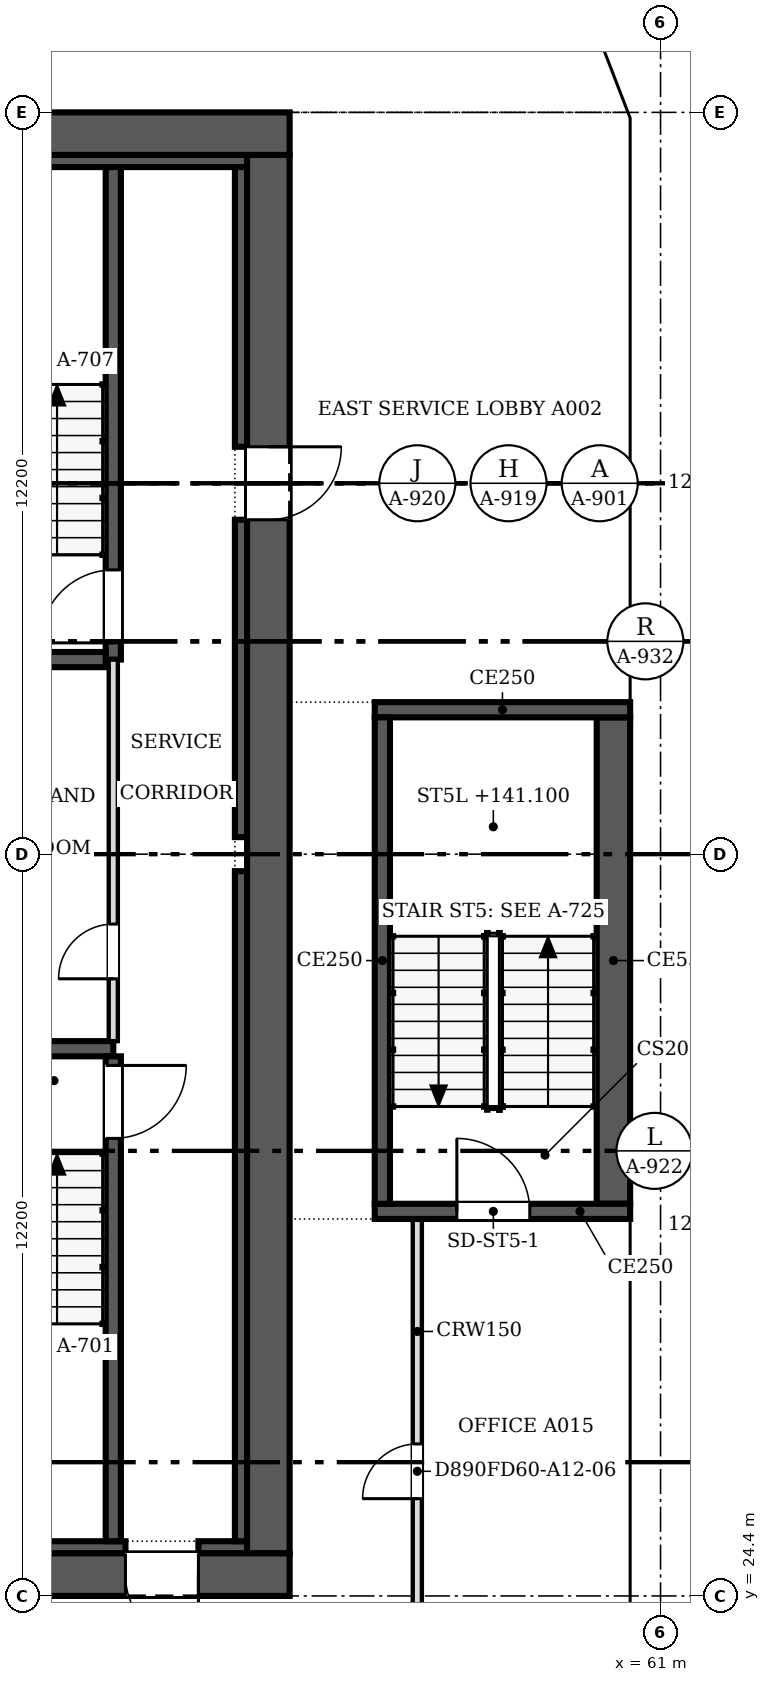
"""IFC4 building model, lengths in metres.
Left out: names, types, materials, properties, quantities, classifications, styles, units other than length and angle.
Written with IfcOpenShell. Run it as: python <this file> out.ifc"""

import sys

from ifc_helpers import new_model, si_unit, direction, frame, frame_2d, origin, place, context, subcontext, project, spatial, polyline, rectangle, outline, extrude, faceted_brep, source, transform, mapped, element, fill, save


model = new_model("IFC4")
c1 = context("Model", 3, precision=1e-05, world=origin(), true_north=direction((0.0, 1.0)))
c2 = subcontext(c1, "Body", "Model", "MODEL_VIEW")
j1 = project(units=[si_unit("LENGTHUNIT", "METRE"), si_unit("PLANEANGLEUNIT", "RADIAN")], contexts=[c1])
p1 = place(None, origin())
s1 = spatial("IfcSite", under=j1, at=p1, CompositionType="ELEMENT")
p2 = place(p1, origin())
s2 = spatial("IfcBuilding", under=s1, at=p2, CompositionType="ELEMENT")
p3 = place(p2, frame((0.0, 0.0, 139.2)))
s3 = spatial("IfcBuildingStorey", under=s2, at=p3, CompositionType="ELEMENT", Elevation=139.2)
m1 = source(origin(), c2, "Body", "Brep", [
    faceted_brep([(3.05, -0.25, 0.0), (6.1, -0.25, 3.8), (6.1, -0.25, 3.8), (3.05, -0.25, 7.6), (0.0, -0.25, 3.8), (0.0, 0.25, 3.8), (3.05, 0.25, 7.6), (6.1, 0.25, 3.8), (6.1, 0.25, 3.8), (3.05, 0.25, 0.0)], [[[0, 1, 2, 3, 4]], [[5, 6, 7, 8, 9]], [[9, 8, 1, 0]], [[7, 6, 3, 2]], [[6, 5, 4, 3]], [[5, 9, 0, 4]], [[1, 8, 7, 2]]]),
])
p4 = place(p3, frame((60.75, 21.35, -3.8), z_axis=(0.0, 0.0, 1.0), x_axis=(0.0, 1.0, 0.0)))
e1 = element("IfcWall", 1, at=p4, inside=s3, PredefinedType="SOLIDWALL", context=c2, shape_type="MappedRepresentation", body=[
    mapped(m1, transform((0.0, 0.0, 0.0), scale=1.0)),
])
m2 = source(origin(), c2, "Body", "SweptSolid", [
    extrude(outline(polyline([(3.05, 0.399), (5.78, 3.8), (3.05, 7.201), (0.321, 3.8), (3.05, 0.399)])), frame((0.0, 0.26, 0.0), z_axis=(0.0, -1.0, 0.0), x_axis=(1.0, 0.0, 0.0)), (0.0, 0.0, 1.0), 0.52),
])
p5 = place(p4, origin())
e2 = element("IfcOpeningElement", 2, at=p5, cuts=e1, PredefinedType="OPENING", context=c2, shape_type="MappedRepresentation", body=[
    mapped(m2, transform((0.0, 0.0, 0.0), scale=1.0)),
])
m3 = source(origin(), c2, "Body", "SweptSolid", [
    extrude(outline(polyline([(3.05, 0.0), (6.1, 3.8), (3.05, 7.6), (0.0, 3.8), (3.05, 0.0)])), frame((0.0, 0.25, 0.0), z_axis=(0.0, -1.0, 0.0), x_axis=(1.0, 0.0, 0.0)), (0.0, 0.0, 1.0), 0.5),
])
p6 = place(p3, frame((60.75, 27.45, -3.8), z_axis=(0.0, 0.0, 1.0), x_axis=(0.0, 1.0, 0.0)))
e3 = element("IfcWall", 3, at=p6, inside=s3, PredefinedType="SOLIDWALL", context=c2, shape_type="MappedRepresentation", body=[
    mapped(m3, transform((0.0, 0.0, 0.0), scale=1.0)),
])
p7 = place(p6, origin())
e4 = element("IfcOpeningElement", 4, at=p7, cuts=e3, PredefinedType="OPENING", context=c2, shape_type="MappedRepresentation", body=[
    mapped(m2, transform((0.0, 0.0, 0.0), scale=1.0)),
])
p8 = place(p3, frame((60.75, 33.55, -3.8), z_axis=(0.0, 0.0, 1.0), x_axis=(0.0, 1.0, 0.0)))
e5 = element("IfcWall", 5, at=p8, inside=s3, PredefinedType="SOLIDWALL", context=c2, shape_type="MappedRepresentation", body=[
    mapped(m1, transform((0.0, 0.0, 0.0), scale=1.0)),
])
p9 = place(p8, origin())
e6 = element("IfcOpeningElement", 6, at=p9, cuts=e5, PredefinedType="OPENING", context=c2, shape_type="MappedRepresentation", body=[
    mapped(m2, transform((0.0, 0.0, 0.0), scale=1.0)),
])
p10 = place(p3, frame((60.75, 39.65, -3.8), z_axis=(0.0, 0.0, 1.0), x_axis=(0.0, 1.0, 0.0)))
e7 = element("IfcWall", 7, at=p10, inside=s3, PredefinedType="SOLIDWALL", context=c2, shape_type="MappedRepresentation", body=[
    mapped(m3, transform((0.0, 0.0, 0.0), scale=1.0)),
])
p11 = place(p10, origin())
e8 = element("IfcOpeningElement", 8, at=p11, cuts=e7, PredefinedType="OPENING", context=c2, shape_type="MappedRepresentation", body=[
    mapped(m2, transform((0.0, 0.0, 0.0), scale=1.0)),
])
m4 = source(origin(), c2, "Body", "Brep", [
    faceted_brep([(3.003, -0.25, 0.0), (3.05, -0.25, 0.06), (3.05, -0.25, 7.54), (3.003, -0.25, 7.6), (0.0, -0.25, 3.8), (0.0, 0.25, 3.8), (2.957, 0.25, 7.541), (2.957, 0.25, 0.059), (3.003, 0.0, 0.0), (3.003, 0.0, 7.6)], [[[0, 1, 2, 3, 4]], [[5, 6, 7]], [[1, 0, 8]], [[9, 3, 2]], [[6, 5, 4, 3, 9]], [[5, 7, 8, 0, 4]], [[1, 8, 7, 6, 9, 2]]]),
])
p12 = place(p3, frame((60.75, 45.75, -3.8), z_axis=(0.0, 0.0, 1.0), x_axis=(0.0, 1.0, 0.0)))
e9 = element("IfcWall", 9, at=p12, inside=s3, PredefinedType="SOLIDWALL", context=c2, shape_type="MappedRepresentation", body=[
    mapped(m4, transform((0.0, 0.0, 0.0), scale=1.0)),
])
m5 = source(origin(), c2, "Body", "SweptSolid", [
    extrude(outline(polyline([(2.803, 6.944), (0.319, 3.8), (2.803, 0.656), (2.803, 6.944)])), frame((0.0, 0.26, 0.0), z_axis=(0.0, -1.0, 0.0), x_axis=(1.0, 0.0, 0.0)), (0.0, 0.0, 1.0), 0.52),
])
p13 = place(p12, origin())
e10 = element("IfcOpeningElement", 10, at=p13, cuts=e9, PredefinedType="OPENING", context=c2, shape_type="MappedRepresentation", body=[
    mapped(m5, transform((0.0, 0.0, 0.0), scale=1.0)),
])
m6 = source(origin(), c2, "Body", "Brep", [
    faceted_brep([(0.047, -0.25, 0.0), (2.997, -0.25, 3.8), (0.047, -0.25, 7.6), (0.0, -0.25, 7.541), (0.0, -0.25, 0.059), (0.093, 0.25, 7.54), (2.944, 0.25, 3.868), (2.944, 0.25, 3.732), (0.093, 0.25, 0.06), (2.997, 0.0, 3.8), (0.047, 0.0, 0.0), (0.047, 0.0, 7.6)], [[[0, 1, 2, 3, 4]], [[5, 6, 7, 8]], [[8, 7, 9, 1, 0, 10]], [[6, 5, 11, 2, 1, 9]], [[3, 2, 11]], [[10, 0, 4]], [[8, 10, 4, 3, 11, 5]], [[9, 7, 6]]]),
])
p14 = place(p3, frame((60.767, 48.71, -3.8), z_axis=(0.0, 0.0, 1.0), x_axis=(-0.359901446078, 0.932990326376, 0.0)))
e11 = element("IfcWall", 11, at=p14, inside=s3, PredefinedType="SOLIDWALL", context=c2, shape_type="MappedRepresentation", body=[
    mapped(m6, transform((0.0, 0.0, 0.0), scale=1.0)),
])
m7 = source(origin(), c2, "Body", "SweptSolid", [
    extrude(outline(polyline([(0.247, 0.665), (2.681, 3.8), (0.247, 6.935), (0.247, 0.665)])), frame((0.0, 0.26, 0.0), z_axis=(0.0, -1.0, 0.0), x_axis=(1.0, 0.0, 0.0)), (0.0, 0.0, 1.0), 0.52),
])
p15 = place(p14, origin())
e12 = element("IfcOpeningElement", 12, at=p15, cuts=e11, PredefinedType="OPENING", context=c2, shape_type="MappedRepresentation", body=[
    mapped(m7, transform((0.0, 0.0, 0.0), scale=1.0)),
])
p16 = place(p2, frame((0.0, 0.0, 143.0)))
s4 = spatial("IfcBuildingStorey", under=s2, at=p16, CompositionType="ELEMENT", Elevation=143.0)
p17 = place(p16, frame((60.75, 18.3, -3.8), z_axis=(0.0, 0.0, 1.0), x_axis=(0.0, 1.0, 0.0)))
e13 = element("IfcWall", 13, at=p17, inside=s4, PredefinedType="SOLIDWALL", context=c2, shape_type="MappedRepresentation", body=[
    mapped(m1, transform((0.0, 0.0, 0.0), scale=1.0)),
])
p18 = place(p17, origin())
e14 = element("IfcOpeningElement", 14, at=p18, cuts=e13, PredefinedType="OPENING", context=c2, shape_type="MappedRepresentation", body=[
    mapped(m2, transform((0.0, 0.0, 0.0), scale=1.0)),
])
p19 = place(p16, frame((60.75, 24.4, -3.8), z_axis=(0.0, 0.0, 1.0), x_axis=(0.0, 1.0, 0.0)))
e15 = element("IfcWall", 15, at=p19, inside=s4, PredefinedType="SOLIDWALL", context=c2, shape_type="MappedRepresentation", body=[
    mapped(m3, transform((0.0, 0.0, 0.0), scale=1.0)),
])
p20 = place(p19, origin())
e16 = element("IfcOpeningElement", 16, at=p20, cuts=e15, PredefinedType="OPENING", context=c2, shape_type="MappedRepresentation", body=[
    mapped(m2, transform((0.0, 0.0, 0.0), scale=1.0)),
])
p21 = place(p16, frame((60.75, 30.5, -3.8), z_axis=(0.0, 0.0, 1.0), x_axis=(0.0, 1.0, 0.0)))
e17 = element("IfcWall", 17, at=p21, inside=s4, PredefinedType="SOLIDWALL", context=c2, shape_type="MappedRepresentation", body=[
    mapped(m3, transform((0.0, 0.0, 0.0), scale=1.0)),
])
p22 = place(p21, origin())
e18 = element("IfcOpeningElement", 18, at=p22, cuts=e17, PredefinedType="OPENING", context=c2, shape_type="MappedRepresentation", body=[
    mapped(m2, transform((0.0, 0.0, 0.0), scale=1.0)),
])
p23 = place(p16, frame((60.75, 36.6, -3.8), z_axis=(0.0, 0.0, 1.0), x_axis=(0.0, 1.0, 0.0)))
e19 = element("IfcWall", 19, at=p23, inside=s4, PredefinedType="SOLIDWALL", context=c2, shape_type="MappedRepresentation", body=[
    mapped(m1, transform((0.0, 0.0, 0.0), scale=1.0)),
])
p24 = place(p23, origin())
e20 = element("IfcOpeningElement", 20, at=p24, cuts=e19, PredefinedType="OPENING", context=c2, shape_type="MappedRepresentation", body=[
    mapped(m2, transform((0.0, 0.0, 0.0), scale=1.0)),
])
m8 = source(origin(), c2, "Body", "Brep", [
    faceted_brep([(3.05, -0.25, 0.0), (6.053, -0.25, 3.8), (3.05, -0.25, 7.6), (0.0, -0.25, 3.8), (0.0, 0.25, 3.8), (3.05, 0.25, 7.6), (6.007, 0.25, 3.859), (6.007, 0.25, 3.741), (3.05, 0.25, 0.0), (6.053, 0.0, 3.8)], [[[0, 1, 2, 3]], [[4, 5, 6, 7, 8]], [[8, 7, 9, 1, 0]], [[6, 5, 2, 1, 9]], [[5, 4, 3, 2]], [[4, 8, 0, 3]], [[9, 7, 6]]]),
])
p25 = place(p16, frame((60.75, 42.7, -3.8), z_axis=(0.0, 0.0, 1.0), x_axis=(0.0, 1.0, 0.0)))
e21 = element("IfcWall", 21, at=p25, inside=s4, PredefinedType="SOLIDWALL", context=c2, shape_type="MappedRepresentation", body=[
    mapped(m8, transform((0.0, 0.0, 0.0), scale=1.0)),
])
m9 = source(origin(), c2, "Body", "SweptSolid", [
    extrude(outline(polyline([(3.049, 0.401), (5.735, 3.8), (3.049, 7.199), (0.321, 3.8), (3.049, 0.401)])), frame((0.0, 0.26, 0.0), z_axis=(0.0, -1.0, 0.0), x_axis=(1.0, 0.0, 0.0)), (0.0, 0.0, 1.0), 0.52),
])
p26 = place(p25, origin())
e22 = element("IfcOpeningElement", 22, at=p26, cuts=e21, PredefinedType="OPENING", context=c2, shape_type="MappedRepresentation", body=[
    mapped(m9, transform((0.0, 0.0, 0.0), scale=1.0)),
])
m10 = source(origin(), c2, "Body", "Brep", [
    faceted_brep([(2.95, -0.25, 0.0), (3.003, -0.25, 0.068), (3.003, -0.25, 7.532), (2.95, -0.25, 7.6), (0.0, -0.25, 3.8), (0.047, 0.25, 3.86), (2.898, 0.25, 7.532), (2.898, 0.25, 0.068), (0.047, 0.25, 3.74), (2.95, 0.0, 0.0), (2.95, 0.0, 7.6), (0.0, 0.0, 3.8)], [[[0, 1, 2, 3, 4]], [[5, 6, 7, 8]], [[1, 0, 9]], [[10, 3, 2]], [[6, 5, 11, 4, 3, 10]], [[8, 7, 9, 0, 4, 11]], [[8, 11, 5]], [[1, 9, 7, 6, 10, 2]]]),
])
p27 = place(p16, frame((60.75, 48.753, -3.8), z_axis=(0.0, 0.0, 1.0), x_axis=(-0.35992665181, 0.932980602862, 0.0)))
e23 = element("IfcWall", 23, at=p27, inside=s4, PredefinedType="SOLIDWALL", context=c2, shape_type="MappedRepresentation", body=[
    mapped(m10, transform((0.0, 0.0, 0.0), scale=1.0)),
])
m11 = source(origin(), c2, "Body", "SweptSolid", [
    extrude(outline(polyline([(2.75, 6.935), (0.316, 3.8), (2.75, 0.665), (2.75, 6.935)])), frame((0.0, 0.26, 0.0), z_axis=(0.0, -1.0, 0.0), x_axis=(1.0, 0.0, 0.0)), (0.0, 0.0, 1.0), 0.52),
])
p28 = place(p27, origin())
e24 = element("IfcOpeningElement", 24, at=p28, cuts=e23, PredefinedType="OPENING", context=c2, shape_type="MappedRepresentation", body=[
    mapped(m11, transform((0.0, 0.0, 0.0), scale=1.0)),
])
p29 = place(p3, frame((54.9, 24.75, 0.0), z_axis=(0.0, 0.0, 1.0), x_axis=(-1.0, 0.0, 0.0)))
e25 = element("IfcWall", 25, at=p29, inside=s3, PredefinedType="SHEAR", context=c2, shape_type="SweptSolid", body=[
    extrude(rectangle(XDim=24.4, YDim=0.7, at=frame_2d((12.2, 0.0))), origin(), (0.0, 0.0, 1.0), 3.8),
])
m12 = source(origin(), c2, "Body", "SweptSolid", [
    extrude(rectangle(XDim=1.2, YDim=2.1, at=frame_2d((0.6, 1.05))), frame((0.0, 0.36, 0.0), z_axis=(0.0, -1.0, 0.0), x_axis=(1.0, 0.0, 0.0)), (0.0, 0.0, 1.0), 0.72),
])
p30 = place(p29, frame((1.5, 0.0, 0.0)))
e26 = element("IfcOpeningElement", 26, at=p30, cuts=e25, PredefinedType="OPENING", context=c2, shape_type="MappedRepresentation", body=[
    mapped(m12, transform((0.0, 0.0, 0.0), scale=1.0)),
])
p31 = place(p3, frame((30.5, 48.45, 0.0), z_axis=(0.0, 0.0, 1.0), x_axis=(1.0, 0.0, 0.0)))
e27 = element("IfcWall", 27, at=p31, inside=s3, PredefinedType="SHEAR", context=c2, shape_type="SweptSolid", body=[
    extrude(rectangle(XDim=24.4, YDim=0.7, at=frame_2d((12.2, 0.0))), origin(), (0.0, 0.0, 1.0), 3.8),
])
p32 = place(p3, frame((54.55, 48.1, 0.0), z_axis=(0.0, 0.0, 1.0), x_axis=(0.0, -1.0, 0.0)))
e28 = element("IfcWall", 28, at=p32, inside=s3, PredefinedType="SHEAR", context=c2, shape_type="SweptSolid", body=[
    extrude(rectangle(XDim=23.0, YDim=0.7, at=frame_2d((11.5, 0.0))), origin(), (0.0, 0.0, 1.0), 3.8),
])
p33 = place(p32, frame((4.8, 0.0, 0.0)))
e29 = element("IfcOpeningElement", 29, at=p33, cuts=e28, PredefinedType="OPENING", context=c2, shape_type="MappedRepresentation", body=[
    mapped(m12, transform((0.0, 0.0, 0.0), scale=1.0)),
])
p34 = place(p3, frame((31.2, 25.2, 0.0), z_axis=(0.0, 0.0, 1.0), x_axis=(1.0, 0.0, 0.0)))
e30 = element("IfcWall", 30, at=p34, inside=s3, PredefinedType="SOLIDWALL", context=c2, shape_type="SweptSolid", body=[
    extrude(rectangle(XDim=21.0, YDim=0.2, at=frame_2d((10.5, 0.0))), origin(), (0.0, 0.0, 1.0), 3.8),
])
p35 = place(p3, frame((53.4, 25.2, 0.0), z_axis=(0.0, 0.0, 1.0), x_axis=(1.0, 0.0, 0.0)))
e31 = element("IfcWall", 31, at=p35, inside=s3, PredefinedType="SOLIDWALL", context=c2, shape_type="SweptSolid", body=[
    extrude(rectangle(XDim=0.8, YDim=0.2, at=frame_2d((0.4, 0.0))), origin(), (0.0, 0.0, 1.0), 3.8),
])
p36 = place(p3, frame((31.2, 48.0, 0.0), z_axis=(0.0, 0.0, 1.0), x_axis=(1.0, 0.0, 0.0)))
e32 = element("IfcWall", 32, at=p36, inside=s3, PredefinedType="SOLIDWALL", context=c2, shape_type="SweptSolid", body=[
    extrude(rectangle(XDim=23.0, YDim=0.2, at=frame_2d((11.5, 0.0))), origin(), (0.0, 0.0, 1.0), 3.8),
])
p37 = place(p3, frame((54.1, 25.3, 0.0), z_axis=(0.0, 0.0, 1.0), x_axis=(0.0, 1.0, 0.0)))
e33 = element("IfcWall", 33, at=p37, inside=s3, PredefinedType="SOLIDWALL", context=c2, shape_type="SweptSolid", body=[
    extrude(rectangle(XDim=11.02, YDim=0.2, at=frame_2d((5.51, 0.0))), origin(), (0.0, 0.0, 1.0), 3.8),
])
p38 = place(p3, frame((54.1, 36.88, 0.0), z_axis=(0.0, 0.0, 1.0), x_axis=(0.0, 1.0, 0.0)))
e34 = element("IfcWall", 34, at=p38, inside=s3, PredefinedType="SOLIDWALL", context=c2, shape_type="SweptSolid", body=[
    extrude(rectangle(XDim=5.22, YDim=0.2, at=frame_2d((2.61, 0.0))), origin(), (0.0, 0.0, 1.0), 3.8),
])
p39 = place(p3, frame((54.1, 43.3, 0.0), z_axis=(0.0, 0.0, 1.0), x_axis=(0.0, 1.0, 0.0)))
e35 = element("IfcWall", 35, at=p39, inside=s3, PredefinedType="SOLIDWALL", context=c2, shape_type="SweptSolid", body=[
    extrude(rectangle(XDim=4.6, YDim=0.2, at=frame_2d((2.3, 0.0))), origin(), (0.0, 0.0, 1.0), 3.8),
])
p40 = place(p3, frame((48.475, 33.4, 0.0), z_axis=(0.0, 0.0, 1.0), x_axis=(1.0, 0.0, 0.0)))
e36 = element("IfcWall", 36, at=p40, inside=s3, PredefinedType="SOLIDWALL", context=c2, shape_type="SweptSolid", body=[
    extrude(rectangle(XDim=3.525, YDim=0.25, at=frame_2d((1.762, 0.0))), origin(), (0.0, 0.0, 1.0), 3.8),
])
p41 = place(p3, frame((52.0, 25.3, 0.0), z_axis=(0.0, 0.0, 1.0), x_axis=(0.0, 1.0, 0.0)))
e37 = element("IfcWall", 37, at=p41, inside=s3, PredefinedType="SOLIDWALL", context=c2, shape_type="SweptSolid", body=[
    extrude(rectangle(XDim=7.975, YDim=0.25, at=frame_2d((3.987, 0.0))), origin(), (0.0, 0.0, 1.0), 3.8),
])
m13 = source(origin(), c2, "Body", "SweptSolid", [
    extrude(rectangle(XDim=1.2, YDim=2.1, at=frame_2d((0.6, 1.05))), frame((0.0, 0.135, 0.0), z_axis=(0.0, -1.0, 0.0), x_axis=(1.0, 0.0, 0.0)), (0.0, 0.0, 1.0), 0.27),
])
p42 = place(p41, frame((6.625, 0.0, 0.0)))
e38 = element("IfcOpeningElement", 38, at=p42, cuts=e37, PredefinedType="OPENING", context=c2, shape_type="MappedRepresentation", body=[
    mapped(m13, transform((0.0, 0.0, 0.0), scale=1.0)),
])
p43 = place(p3, frame((52.0, 39.8, 0.0), z_axis=(0.0, 0.0, 1.0), x_axis=(0.0, 1.0, 0.0)))
e39 = element("IfcWall", 39, at=p43, inside=s3, PredefinedType="SOLIDWALL", context=c2, shape_type="SweptSolid", body=[
    extrude(rectangle(XDim=8.1, YDim=0.25, at=frame_2d((4.05, 0.0))), origin(), (0.0, 0.0, 1.0), 3.8),
])
p44 = place(p43, frame((0.275, 0.0, 0.0)))
e40 = element("IfcOpeningElement", 40, at=p44, cuts=e39, PredefinedType="OPENING", context=c2, shape_type="MappedRepresentation", body=[
    mapped(m13, transform((0.0, 0.0, 0.0), scale=1.0)),
])
p45 = place(p3, frame((48.475, 39.8, 0.0), z_axis=(0.0, 0.0, 1.0), x_axis=(1.0, 0.0, 0.0)))
e41 = element("IfcWall", 41, at=p45, inside=s3, PredefinedType="SOLIDWALL", context=c2, shape_type="SweptSolid", body=[
    extrude(rectangle(XDim=3.4, YDim=0.25, at=frame_2d((1.7, 0.0))), origin(), (0.0, 0.0, 1.0), 3.8),
])
p46 = place(p3, frame((52.0, 33.525, 0.0), z_axis=(0.0, 0.0, 1.0), x_axis=(0.0, 1.0, 0.0)))
e42 = element("IfcWall", 42, at=p46, inside=s3, PredefinedType="PARTITIONING", context=c2, shape_type="SweptSolid", body=[
    extrude(rectangle(XDim=6.275, YDim=0.15, at=frame_2d((3.138, 0.0))), origin(), (0.0, 0.0, 1.0), 3.6),
])
m14 = source(origin(), c2, "Body", "SweptSolid", [
    extrude(rectangle(XDim=0.9, YDim=2.1, at=frame_2d((0.45, 1.05))), frame((0.0, 0.085, 0.0), z_axis=(0.0, -1.0, 0.0), x_axis=(1.0, 0.0, 0.0)), (0.0, 0.0, 1.0), 0.17),
])
p47 = place(p46, frame((1.025, 0.0, 0.0)))
e43 = element("IfcOpeningElement", 43, at=p47, cuts=e42, PredefinedType="OPENING", context=c2, shape_type="MappedRepresentation", body=[
    mapped(m14, transform((0.0, 0.0, 0.0), scale=1.0)),
])
p48 = place(p3, frame((60.5, 30.725, 0.0), z_axis=(0.0, 0.0, 1.0), x_axis=(-1.0, 0.0, 0.0)))
e44 = element("IfcWall", 44, at=p48, inside=s3, PredefinedType="SOLIDWALL", context=c2, shape_type="SweptSolid", body=[
    extrude(rectangle(XDim=4.2, YDim=0.25, at=frame_2d((2.1, 0.0))), origin(), (0.0, 0.0, 1.0), 3.8),
])
p49 = place(p48, frame((1.65, 0.0, 0.0)))
e45 = element("IfcOpeningElement", 45, at=p49, cuts=e44, PredefinedType="OPENING", context=c2, shape_type="MappedRepresentation", body=[
    mapped(m13, transform((0.0, 0.0, 0.0), scale=1.0)),
])
p50 = place(p3, frame((56.425, 30.85, 0.0), z_axis=(0.0, 0.0, 1.0), x_axis=(0.0, 1.0, 0.0)))
e46 = element("IfcWall", 46, at=p50, inside=s3, PredefinedType="SOLIDWALL", context=c2, shape_type="SweptSolid", body=[
    extrude(rectangle(XDim=8.0, YDim=0.25, at=frame_2d((4.0, 0.0))), origin(), (0.0, 0.0, 1.0), 3.8),
])
p51 = place(p3, frame((56.3, 38.975, 0.0), z_axis=(0.0, 0.0, 1.0), x_axis=(1.0, 0.0, 0.0)))
e47 = element("IfcWall", 47, at=p51, inside=s3, PredefinedType="SOLIDWALL", context=c2, shape_type="SweptSolid", body=[
    extrude(rectangle(XDim=4.2, YDim=0.25, at=frame_2d((2.1, 0.0))), origin(), (0.0, 0.0, 1.0), 3.8),
])
p52 = place(p3, frame((60.225, 38.85, 0.0), z_axis=(0.0, 0.0, 1.0), x_axis=(0.0, -1.0, 0.0)))
e48 = element("IfcWall", 48, at=p52, inside=s3, PredefinedType="SOLIDWALL", context=c2, shape_type="SweptSolid", body=[
    extrude(rectangle(XDim=8.0, YDim=0.55, at=frame_2d((4.0, 0.0))), origin(), (0.0, 0.0, 1.0), 3.8),
])
p53 = place(p3, frame((57.0, 30.6, 0.0), z_axis=(0.0, 0.0, 1.0), x_axis=(0.0, -1.0, 0.0)))
e49 = element("IfcWall", 49, at=p53, inside=s3, PredefinedType="PARTITIONING", context=c2, shape_type="SweptSolid", body=[
    extrude(rectangle(XDim=8.3, YDim=0.15, at=frame_2d((4.15, 0.0))), origin(), (0.0, 0.0, 1.0), 3.067),
])
p54 = place(p53, frame((3.7, 0.0, 0.0)))
e50 = element("IfcOpeningElement", 50, at=p54, cuts=e49, PredefinedType="OPENING", context=c2, shape_type="MappedRepresentation", body=[
    mapped(m14, transform((0.0, 0.0, 0.0), scale=1.0)),
])
m15 = source(origin(), c2, "Body", "SweptSolid", [
    extrude(rectangle(XDim=1.2, YDim=2.1, at=frame_2d((0.6, 1.05))), frame((0.0, 0.025, 0.0), z_axis=(0.0, -1.0, 0.0), x_axis=(1.0, 0.0, 0.0)), (0.0, 0.0, 1.0), 0.05),
])
p55 = place(p30, origin())
e51 = element("IfcDoor", 51, at=p55, inside=s3, OperationType="SINGLE_SWING_LEFT", PredefinedType="DOOR", context=c2, shape_type="MappedRepresentation", body=[
    mapped(m15, transform((0.0, 0.0, 0.0), scale=1.0)),
])
fill(e26, e51)
p56 = place(p33, origin())
e52 = element("IfcDoor", 52, at=p56, inside=s3, OperationType="SINGLE_SWING_LEFT", PredefinedType="DOOR", context=c2, shape_type="MappedRepresentation", body=[
    mapped(m15, transform((0.0, 0.0, 0.0), scale=1.0)),
])
fill(e29, e52)
p57 = place(p42, origin())
e53 = element("IfcDoor", 53, at=p57, inside=s3, OperationType="SINGLE_SWING_RIGHT", PredefinedType="DOOR", context=c2, shape_type="MappedRepresentation", body=[
    mapped(m15, transform((0.0, 0.0, 0.0), scale=1.0)),
])
fill(e38, e53)
p58 = place(p44, origin())
e54 = element("IfcDoor", 54, at=p58, inside=s3, OperationType="SINGLE_SWING_LEFT", PredefinedType="DOOR", context=c2, shape_type="MappedRepresentation", body=[
    mapped(m15, transform((0.0, 0.0, 0.0), scale=1.0)),
])
fill(e40, e54)
m16 = source(origin(), c2, "Body", "SweptSolid", [
    extrude(rectangle(XDim=0.9, YDim=2.1, at=frame_2d((0.45, 1.05))), frame((0.0, 0.025, 0.0), z_axis=(0.0, -1.0, 0.0), x_axis=(1.0, 0.0, 0.0)), (0.0, 0.0, 1.0), 0.05),
])
p59 = place(p47, origin())
e55 = element("IfcDoor", 55, at=p59, inside=s3, OperationType="SINGLE_SWING_LEFT", PredefinedType="DOOR", context=c2, shape_type="MappedRepresentation", body=[
    mapped(m16, transform((0.0, 0.0, 0.0), scale=1.0)),
])
fill(e43, e55)
p60 = place(p49, origin())
e56 = element("IfcDoor", 56, at=p60, inside=s3, OperationType="SINGLE_SWING_RIGHT", PredefinedType="DOOR", context=c2, shape_type="MappedRepresentation", body=[
    mapped(m15, transform((0.0, 0.0, 0.0), scale=1.0)),
])
fill(e45, e56)
p61 = place(p54, origin())
e57 = element("IfcDoor", 57, at=p61, inside=s3, OperationType="SINGLE_SWING_RIGHT", PredefinedType="DOOR", context=c2, shape_type="MappedRepresentation", body=[
    mapped(m16, transform((0.0, 0.0, 0.0), scale=1.0)),
])
fill(e50, e57)
save(model, sys.argv[1])
